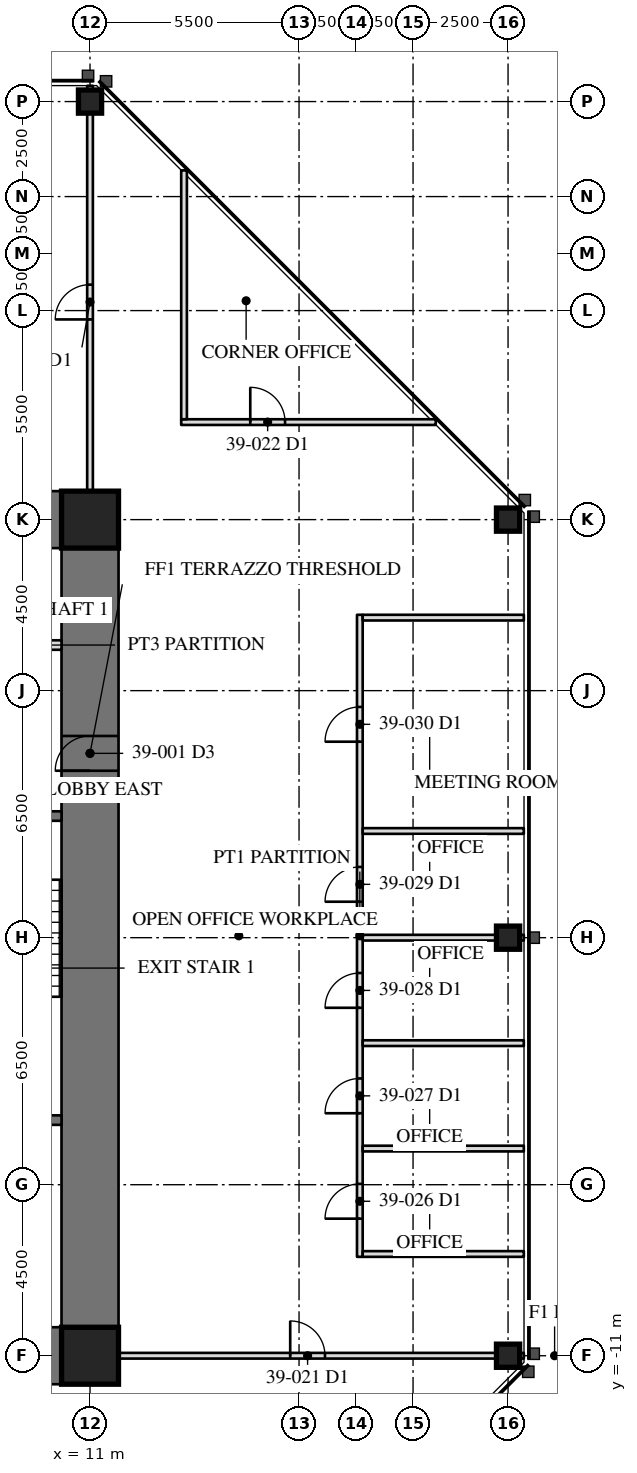
"""IFC4 building model, lengths in metres.
Left out: names, types, materials, properties, quantities, classifications, styles, units other than length and angle.
Written with IfcOpenShell. Run it as: python <this file> out.ifc"""

import sys

from ifc_helpers import new_model, si_unit, direction, frame, frame_2d, origin, origin_2d, place, context, subcontext, project, spatial, rectangle, hollow_rectangle, extrude, element, fill, save


model = new_model("IFC4")
c1 = context("Model", 3, precision=1e-05, world=origin(), true_north=direction((0.0, 1.0)))
c2 = subcontext(c1, "Body", "Model", "MODEL_VIEW")
j1 = project(units=[si_unit("LENGTHUNIT", "METRE"), si_unit("PLANEANGLEUNIT", "RADIAN")], contexts=[c1])
p1 = place(None, origin())
s1 = spatial("IfcSite", under=j1, at=p1, CompositionType="ELEMENT")
p2 = place(p1, origin())
s2 = spatial("IfcBuilding", under=s1, at=p2, CompositionType="ELEMENT")
p3 = place(p2, frame((0.0, 0.0, 166.4)))
s3 = spatial("IfcBuildingStorey", under=s2, at=p3, CompositionType="ELEMENT", Elevation=166.4)
for number, where, z_axis, x_axis in (
    (1, (22.0, -11.0, 0.0), (0.0, 0.0, 1.0), (0.0, 1.0, 0.0)),
    (2, (22.0, 0.0, 0.0), (0.0, 0.0, 1.0), (0.0, 1.0, 0.0)),
    (3, (22.0, 11.0, 0.0), (0.0, 0.0, 1.0), (0.0, 1.0, 0.0)),
    (4, (11.0, 22.0, 0.0), (0.0, 0.0, 1.0), (1.0, 0.0, 0.0)),
):
    element("IfcColumn", number, at=place(p3, frame(where, z_axis=z_axis, x_axis=x_axis)), inside=s3, PredefinedType="COLUMN", context=c2, shape_type="SweptSolid", body=[
        extrude(hollow_rectangle(XDim=0.61, YDim=0.61, WallThickness=0.076, at=origin_2d()), origin(), (0.0, 0.0, 1.0), 4.1),
    ])
p4 = place(p3, frame((11.0, -11.0, 0.0), z_axis=(0.0, 0.0, 1.0), x_axis=(0.0, 1.0, 0.0)))
e5 = element("IfcWall", 5, at=p4, inside=s3, PredefinedType="SHEAR", context=c2, shape_type="SweptSolid", body=[
    extrude(rectangle(XDim=22.0, YDim=1.5, at=frame_2d((11.0, 0.0))), origin(), (0.0, 0.0, 1.0), 4.1),
])
p5 = place(p4, frame((15.393, 0.0, 0.0)))
e6 = element("IfcOpeningElement", 6, at=p5, cuts=e5, PredefinedType="OPENING", context=c2, shape_type="SweptSolid", body=[
    extrude(rectangle(XDim=0.915, YDim=2.134, at=frame_2d((0.458, 1.067))), frame((0.0, 0.76, 0.0), z_axis=(0.0, -1.0, 0.0), x_axis=(1.0, 0.0, 0.0)), (0.0, 0.0, 1.0), 1.52),
])
for number, where, z_axis, x_axis in (
    (7, (11.0, 11.0, 0.0), (0.0, 0.0, 1.0), (-1.0, 0.0, 0.0)),
    (8, (6.5, -11.0, 0.0), (0.0, 0.0, 1.0), (1.0, 0.0, 0.0)),
):
    element("IfcWall", number, at=place(p3, frame(where, z_axis=z_axis, x_axis=x_axis)), inside=s3, PredefinedType="SHEAR", context=c2, shape_type="SweptSolid", body=[
        extrude(rectangle(XDim=4.5, YDim=1.5, at=frame_2d((2.25, 0.0))), origin(), (0.0, 0.0, 1.0), 4.1),
    ])
for number, where, z_axis, x_axis in (
    (9, (11.0, 11.0, 0.0), (0.0, 0.0, 1.0), (1.0, 0.0, 0.0)),
    (10, (11.0, -11.0, 0.0), (0.0, 0.0, 1.0), (1.0, 0.0, 0.0)),
):
    element("IfcColumn", number, at=place(p3, frame(where, z_axis=z_axis, x_axis=x_axis)), inside=s3, PredefinedType="COLUMN", context=c2, shape_type="SweptSolid", body=[
        extrude(hollow_rectangle(XDim=1.499, YDim=1.499, WallThickness=0.102, at=origin_2d()), origin(), (0.0, 0.0, 1.0), 4.1),
    ])
p6 = place(p3, frame((6.95, -4.8, 0.0), z_axis=(0.0, 0.0, 1.0), x_axis=(1.0, 0.0, 0.0)))
e11 = element("IfcWall", 11, at=p6, inside=s3, PredefinedType="SOLIDWALL", context=c2, shape_type="SweptSolid", body=[
    extrude(rectangle(XDim=3.3, YDim=0.25, at=frame_2d((1.65, 0.0))), origin(), (0.0, 0.0, 1.0), 3.91),
])
p7 = place(p3, frame((6.95, 3.2, 0.0), z_axis=(0.0, 0.0, 1.0), x_axis=(1.0, 0.0, 0.0)))
e12 = element("IfcWall", 12, at=p7, inside=s3, PredefinedType="SOLIDWALL", context=c2, shape_type="SweptSolid", body=[
    extrude(rectangle(XDim=3.3, YDim=0.25, at=frame_2d((1.65, 0.0))), origin(), (0.0, 0.0, 1.0), 3.91),
])
p8 = place(p7, frame((1.116, 0.0, 0.0)))
e13 = element("IfcOpeningElement", 13, at=p8, cuts=e12, PredefinedType="OPENING", context=c2, shape_type="SweptSolid", body=[
    extrude(rectangle(XDim=1.067, YDim=2.134, at=frame_2d((0.533, 1.067))), frame((0.0, 0.135, 0.0), z_axis=(0.0, -1.0, 0.0), x_axis=(1.0, 0.0, 0.0)), (0.0, 0.0, 1.0), 0.27),
])
p9 = place(p3, frame((6.95, 7.7, 0.0), z_axis=(0.0, 0.0, 1.0), x_axis=(1.0, 0.0, 0.0)))
e14 = element("IfcWall", 14, at=p9, inside=s3, PredefinedType="PARTITIONING", context=c2, shape_type="SweptSolid", body=[
    extrude(rectangle(XDim=3.3, YDim=0.25, at=frame_2d((1.65, 0.0))), origin(), (0.0, 0.0, 1.0), 3.91),
])
p10 = place(p9, frame((0.45, 0.0, 0.0)))
e15 = element("IfcOpeningElement", 15, at=p10, cuts=e14, PredefinedType="OPENING", context=c2, shape_type="SweptSolid", body=[
    extrude(rectangle(XDim=1.219, YDim=2.134, at=frame_2d((0.609, 1.067))), frame((0.0, 0.135, 0.0), z_axis=(0.0, -1.0, 0.0), x_axis=(1.0, 0.0, 0.0)), (0.0, 0.0, 1.0), 0.27),
])
p11 = place(p3, frame((11.0, 11.75, 0.0), z_axis=(0.0, 0.0, 1.0), x_axis=(0.0, 1.0, 0.0)))
e16 = element("IfcWall", 16, at=p11, inside=s3, PredefinedType="PARTITIONING", context=c2, shape_type="SweptSolid", body=[
    extrude(rectangle(XDim=10.665, YDim=0.15, at=frame_2d((5.333, 0.0))), origin(), (0.0, 0.0, 1.0), 3.326),
])
p12 = place(p11, frame((4.518, 0.0, 0.0)))
e17 = element("IfcOpeningElement", 17, at=p12, cuts=e16, PredefinedType="OPENING", context=c2, shape_type="SweptSolid", body=[
    extrude(rectangle(XDim=0.915, YDim=2.134, at=frame_2d((0.458, 1.067))), frame((0.0, 0.085, 0.0), z_axis=(0.0, -1.0, 0.0), x_axis=(1.0, 0.0, 0.0)), (0.0, 0.0, 1.0), 0.17),
])
p13 = place(p3, frame((11.75, -11.0, 0.0), z_axis=(0.0, 0.0, 1.0), x_axis=(1.0, 0.0, 0.0)))
e18 = element("IfcWall", 18, at=p13, inside=s3, PredefinedType="PARTITIONING", context=c2, shape_type="SweptSolid", body=[
    extrude(rectangle(XDim=10.665, YDim=0.15, at=frame_2d((5.333, 0.0))), origin(), (0.0, 0.0, 1.0), 3.326),
])
p14 = place(p13, frame((4.518, 0.0, 0.0)))
e19 = element("IfcOpeningElement", 19, at=p14, cuts=e18, PredefinedType="OPENING", context=c2, shape_type="SweptSolid", body=[
    extrude(rectangle(XDim=0.915, YDim=2.134, at=frame_2d((0.458, 1.067))), frame((0.0, 0.085, 0.0), z_axis=(0.0, -1.0, 0.0), x_axis=(1.0, 0.0, 0.0)), (0.0, 0.0, 1.0), 0.17),
])
p15 = place(p3, frame((13.399, 13.566, 0.0), z_axis=(0.0, 0.0, 1.0), x_axis=(1.0, 0.0, 0.0)))
e20 = element("IfcWall", 20, at=p15, inside=s3, PredefinedType="PARTITIONING", context=c2, shape_type="SweptSolid", body=[
    extrude(rectangle(XDim=6.698, YDim=0.15, at=frame_2d((3.349, 0.0))), origin(), (0.0, 0.0, 1.0), 3.91),
])
p16 = place(p15, frame((1.817, 0.0, 0.0)))
e21 = element("IfcOpeningElement", 21, at=p16, cuts=e20, PredefinedType="OPENING", context=c2, shape_type="SweptSolid", body=[
    extrude(rectangle(XDim=0.915, YDim=2.134, at=frame_2d((0.458, 1.067))), frame((0.0, 0.085, 0.0), z_axis=(0.0, -1.0, 0.0), x_axis=(1.0, 0.0, 0.0)), (0.0, 0.0, 1.0), 0.17),
])
p17 = place(p3, frame((13.474, 13.641, 0.0), z_axis=(0.0, 0.0, 1.0), x_axis=(0.0, 1.0, 0.0)))
e22 = element("IfcWall", 22, at=p17, inside=s3, PredefinedType="PARTITIONING", context=c2, shape_type="SweptSolid", body=[
    extrude(rectangle(XDim=6.548, YDim=0.15, at=frame_2d((3.274, 0.0))), origin(), (0.0, 0.0, 1.0), 3.91),
])
p18 = place(p3, frame((18.1, -8.398, 0.0), z_axis=(0.0, 0.0, 1.0), x_axis=(0.0, 1.0, 0.0)))
e23 = element("IfcWall", 23, at=p18, inside=s3, PredefinedType="PARTITIONING", context=c2, shape_type="SweptSolid", body=[
    extrude(rectangle(XDim=16.894, YDim=0.15, at=frame_2d((8.447, 0.0))), origin(), (0.0, 0.0, 1.0), 3.91),
])
p19 = place(p18, frame((1.004, 0.0, 0.0)))
e24 = element("IfcOpeningElement", 24, at=p19, cuts=e23, PredefinedType="OPENING", context=c2, shape_type="SweptSolid", body=[
    extrude(rectangle(XDim=0.915, YDim=2.134, at=frame_2d((0.458, 1.067))), frame((0.0, 0.085, 0.0), z_axis=(0.0, -1.0, 0.0), x_axis=(1.0, 0.0, 0.0)), (0.0, 0.0, 1.0), 0.17),
])
p20 = place(p18, frame((3.779, 0.0, 0.0)))
e25 = element("IfcOpeningElement", 25, at=p20, cuts=e23, PredefinedType="OPENING", context=c2, shape_type="SweptSolid", body=[
    extrude(rectangle(XDim=0.915, YDim=2.134, at=frame_2d((0.458, 1.067))), frame((0.0, 0.085, 0.0), z_axis=(0.0, -1.0, 0.0), x_axis=(1.0, 0.0, 0.0)), (0.0, 0.0, 1.0), 0.17),
])
p21 = place(p18, frame((6.553, 0.0, 0.0)))
e26 = element("IfcOpeningElement", 26, at=p21, cuts=e23, PredefinedType="OPENING", context=c2, shape_type="SweptSolid", body=[
    extrude(rectangle(XDim=0.915, YDim=2.134, at=frame_2d((0.458, 1.067))), frame((0.0, 0.085, 0.0), z_axis=(0.0, -1.0, 0.0), x_axis=(1.0, 0.0, 0.0)), (0.0, 0.0, 1.0), 0.17),
])
p22 = place(p18, frame((9.344, 0.0, 0.0)))
e27 = element("IfcOpeningElement", 27, at=p22, cuts=e23, PredefinedType="OPENING", context=c2, shape_type="SweptSolid", body=[
    extrude(rectangle(XDim=0.915, YDim=2.134, at=frame_2d((0.458, 1.067))), frame((0.0, 0.085, 0.0), z_axis=(0.0, -1.0, 0.0), x_axis=(1.0, 0.0, 0.0)), (0.0, 0.0, 1.0), 0.17),
])
p23 = place(p18, frame((13.554, 0.0, 0.0)))
e28 = element("IfcOpeningElement", 28, at=p23, cuts=e23, PredefinedType="OPENING", context=c2, shape_type="SweptSolid", body=[
    extrude(rectangle(XDim=0.915, YDim=2.134, at=frame_2d((0.458, 1.067))), frame((0.0, 0.085, 0.0), z_axis=(0.0, -1.0, 0.0), x_axis=(1.0, 0.0, 0.0)), (0.0, 0.0, 1.0), 0.17),
])
for number, where, z_axis, x_axis in (
    (29, (18.175, -8.323, 0.0), (0.0, 0.0, 1.0), (1.0, 0.0, 0.0)),
    (30, (18.175, -5.549, 0.0), (0.0, 0.0, 1.0), (1.0, 0.0, 0.0)),
    (31, (18.175, -2.775, 0.0), (0.0, 0.0, 1.0), (1.0, 0.0, 0.0)),
):
    element("IfcWall", number, at=place(p3, frame(where, z_axis=z_axis, x_axis=x_axis)), inside=s3, PredefinedType="PARTITIONING", context=c2, shape_type="SweptSolid", body=[
        extrude(rectangle(XDim=4.24, YDim=0.15, at=frame_2d((2.12, 0.0))), origin(), (0.0, 0.0, 1.0), 3.91),
    ])
p24 = place(p3, frame((18.175, 0.0, 0.0), z_axis=(0.0, 0.0, 1.0), x_axis=(1.0, 0.0, 0.0)))
e32 = element("IfcWall", 32, at=p24, inside=s3, PredefinedType="PARTITIONING", context=c2, shape_type="SweptSolid", body=[
    extrude(rectangle(XDim=4.24, YDim=0.15, at=frame_2d((2.12, 0.0))), origin(), (0.0, 0.0, 1.0), 3.326),
])
for number, where, z_axis, x_axis in (
    (33, (18.175, 2.807, 0.0), (0.0, 0.0, 1.0), (1.0, 0.0, 0.0)),
    (34, (18.175, 8.421, 0.0), (0.0, 0.0, 1.0), (1.0, 0.0, 0.0)),
):
    element("IfcWall", number, at=place(p3, frame(where, z_axis=z_axis, x_axis=x_axis)), inside=s3, PredefinedType="PARTITIONING", context=c2, shape_type="SweptSolid", body=[
        extrude(rectangle(XDim=4.24, YDim=0.15, at=frame_2d((2.12, 0.0))), origin(), (0.0, 0.0, 1.0), 3.91),
    ])
p25 = place(p5, origin())
e35 = element("IfcDoor", 35, at=p25, inside=s3, OperationType="SINGLE_SWING_RIGHT", PredefinedType="DOOR", context=c2, shape_type="SweptSolid", body=[
    extrude(rectangle(XDim=0.915, YDim=2.134, at=frame_2d((0.458, 1.067))), frame((0.0, -0.675, 0.0), z_axis=(0.0, -1.0, 0.0), x_axis=(1.0, 0.0, 0.0)), (0.0, 0.0, 1.0), 0.05),
])
fill(e6, e35)
p26 = place(p12, origin())
e36 = element("IfcDoor", 36, at=p26, inside=s3, OperationType="SINGLE_SWING_LEFT", PredefinedType="DOOR", context=c2, shape_type="SweptSolid", body=[
    extrude(rectangle(XDim=0.915, YDim=2.134, at=frame_2d((0.458, 1.067))), frame((0.0, 0.025, 0.0), z_axis=(0.0, -1.0, 0.0), x_axis=(1.0, 0.0, 0.0)), (0.0, 0.0, 1.0), 0.05),
])
fill(e17, e36)
p27 = place(p14, origin())
e37 = element("IfcDoor", 37, at=p27, inside=s3, OperationType="SINGLE_SWING_LEFT", PredefinedType="DOOR", context=c2, shape_type="SweptSolid", body=[
    extrude(rectangle(XDim=0.915, YDim=2.134, at=frame_2d((0.458, 1.067))), frame((0.0, 0.025, 0.0), z_axis=(0.0, -1.0, 0.0), x_axis=(1.0, 0.0, 0.0)), (0.0, 0.0, 1.0), 0.05),
])
fill(e19, e37)
p28 = place(p16, origin())
e38 = element("IfcDoor", 38, at=p28, inside=s3, OperationType="SINGLE_SWING_LEFT", PredefinedType="DOOR", context=c2, shape_type="SweptSolid", body=[
    extrude(rectangle(XDim=0.915, YDim=2.134, at=frame_2d((0.458, 1.067))), frame((0.0, 0.025, 0.0), z_axis=(0.0, -1.0, 0.0), x_axis=(1.0, 0.0, 0.0)), (0.0, 0.0, 1.0), 0.05),
])
fill(e21, e38)
p29 = place(p19, origin())
e39 = element("IfcDoor", 39, at=p29, inside=s3, OperationType="SINGLE_SWING_LEFT", PredefinedType="DOOR", context=c2, shape_type="SweptSolid", body=[
    extrude(rectangle(XDim=0.915, YDim=2.134, at=frame_2d((0.458, 1.067))), frame((0.0, 0.025, 0.0), z_axis=(0.0, -1.0, 0.0), x_axis=(1.0, 0.0, 0.0)), (0.0, 0.0, 1.0), 0.05),
])
fill(e24, e39)
p30 = place(p20, origin())
e40 = element("IfcDoor", 40, at=p30, inside=s3, OperationType="SINGLE_SWING_LEFT", PredefinedType="DOOR", context=c2, shape_type="SweptSolid", body=[
    extrude(rectangle(XDim=0.915, YDim=2.134, at=frame_2d((0.458, 1.067))), frame((0.0, 0.025, 0.0), z_axis=(0.0, -1.0, 0.0), x_axis=(1.0, 0.0, 0.0)), (0.0, 0.0, 1.0), 0.05),
])
fill(e25, e40)
p31 = place(p21, origin())
e41 = element("IfcDoor", 41, at=p31, inside=s3, OperationType="SINGLE_SWING_LEFT", PredefinedType="DOOR", context=c2, shape_type="SweptSolid", body=[
    extrude(rectangle(XDim=0.915, YDim=2.134, at=frame_2d((0.458, 1.067))), frame((0.0, 0.025, 0.0), z_axis=(0.0, -1.0, 0.0), x_axis=(1.0, 0.0, 0.0)), (0.0, 0.0, 1.0), 0.05),
])
fill(e26, e41)
p32 = place(p22, origin())
e42 = element("IfcDoor", 42, at=p32, inside=s3, OperationType="SINGLE_SWING_LEFT", PredefinedType="DOOR", context=c2, shape_type="SweptSolid", body=[
    extrude(rectangle(XDim=0.915, YDim=2.134, at=frame_2d((0.458, 1.067))), frame((0.0, 0.025, 0.0), z_axis=(0.0, -1.0, 0.0), x_axis=(1.0, 0.0, 0.0)), (0.0, 0.0, 1.0), 0.05),
])
fill(e27, e42)
p33 = place(p23, origin())
e43 = element("IfcDoor", 43, at=p33, inside=s3, OperationType="SINGLE_SWING_LEFT", PredefinedType="DOOR", context=c2, shape_type="SweptSolid", body=[
    extrude(rectangle(XDim=0.915, YDim=2.134, at=frame_2d((0.458, 1.067))), frame((0.0, 0.025, 0.0), z_axis=(0.0, -1.0, 0.0), x_axis=(1.0, 0.0, 0.0)), (0.0, 0.0, 1.0), 0.05),
])
fill(e28, e43)
save(model, sys.argv[1])
